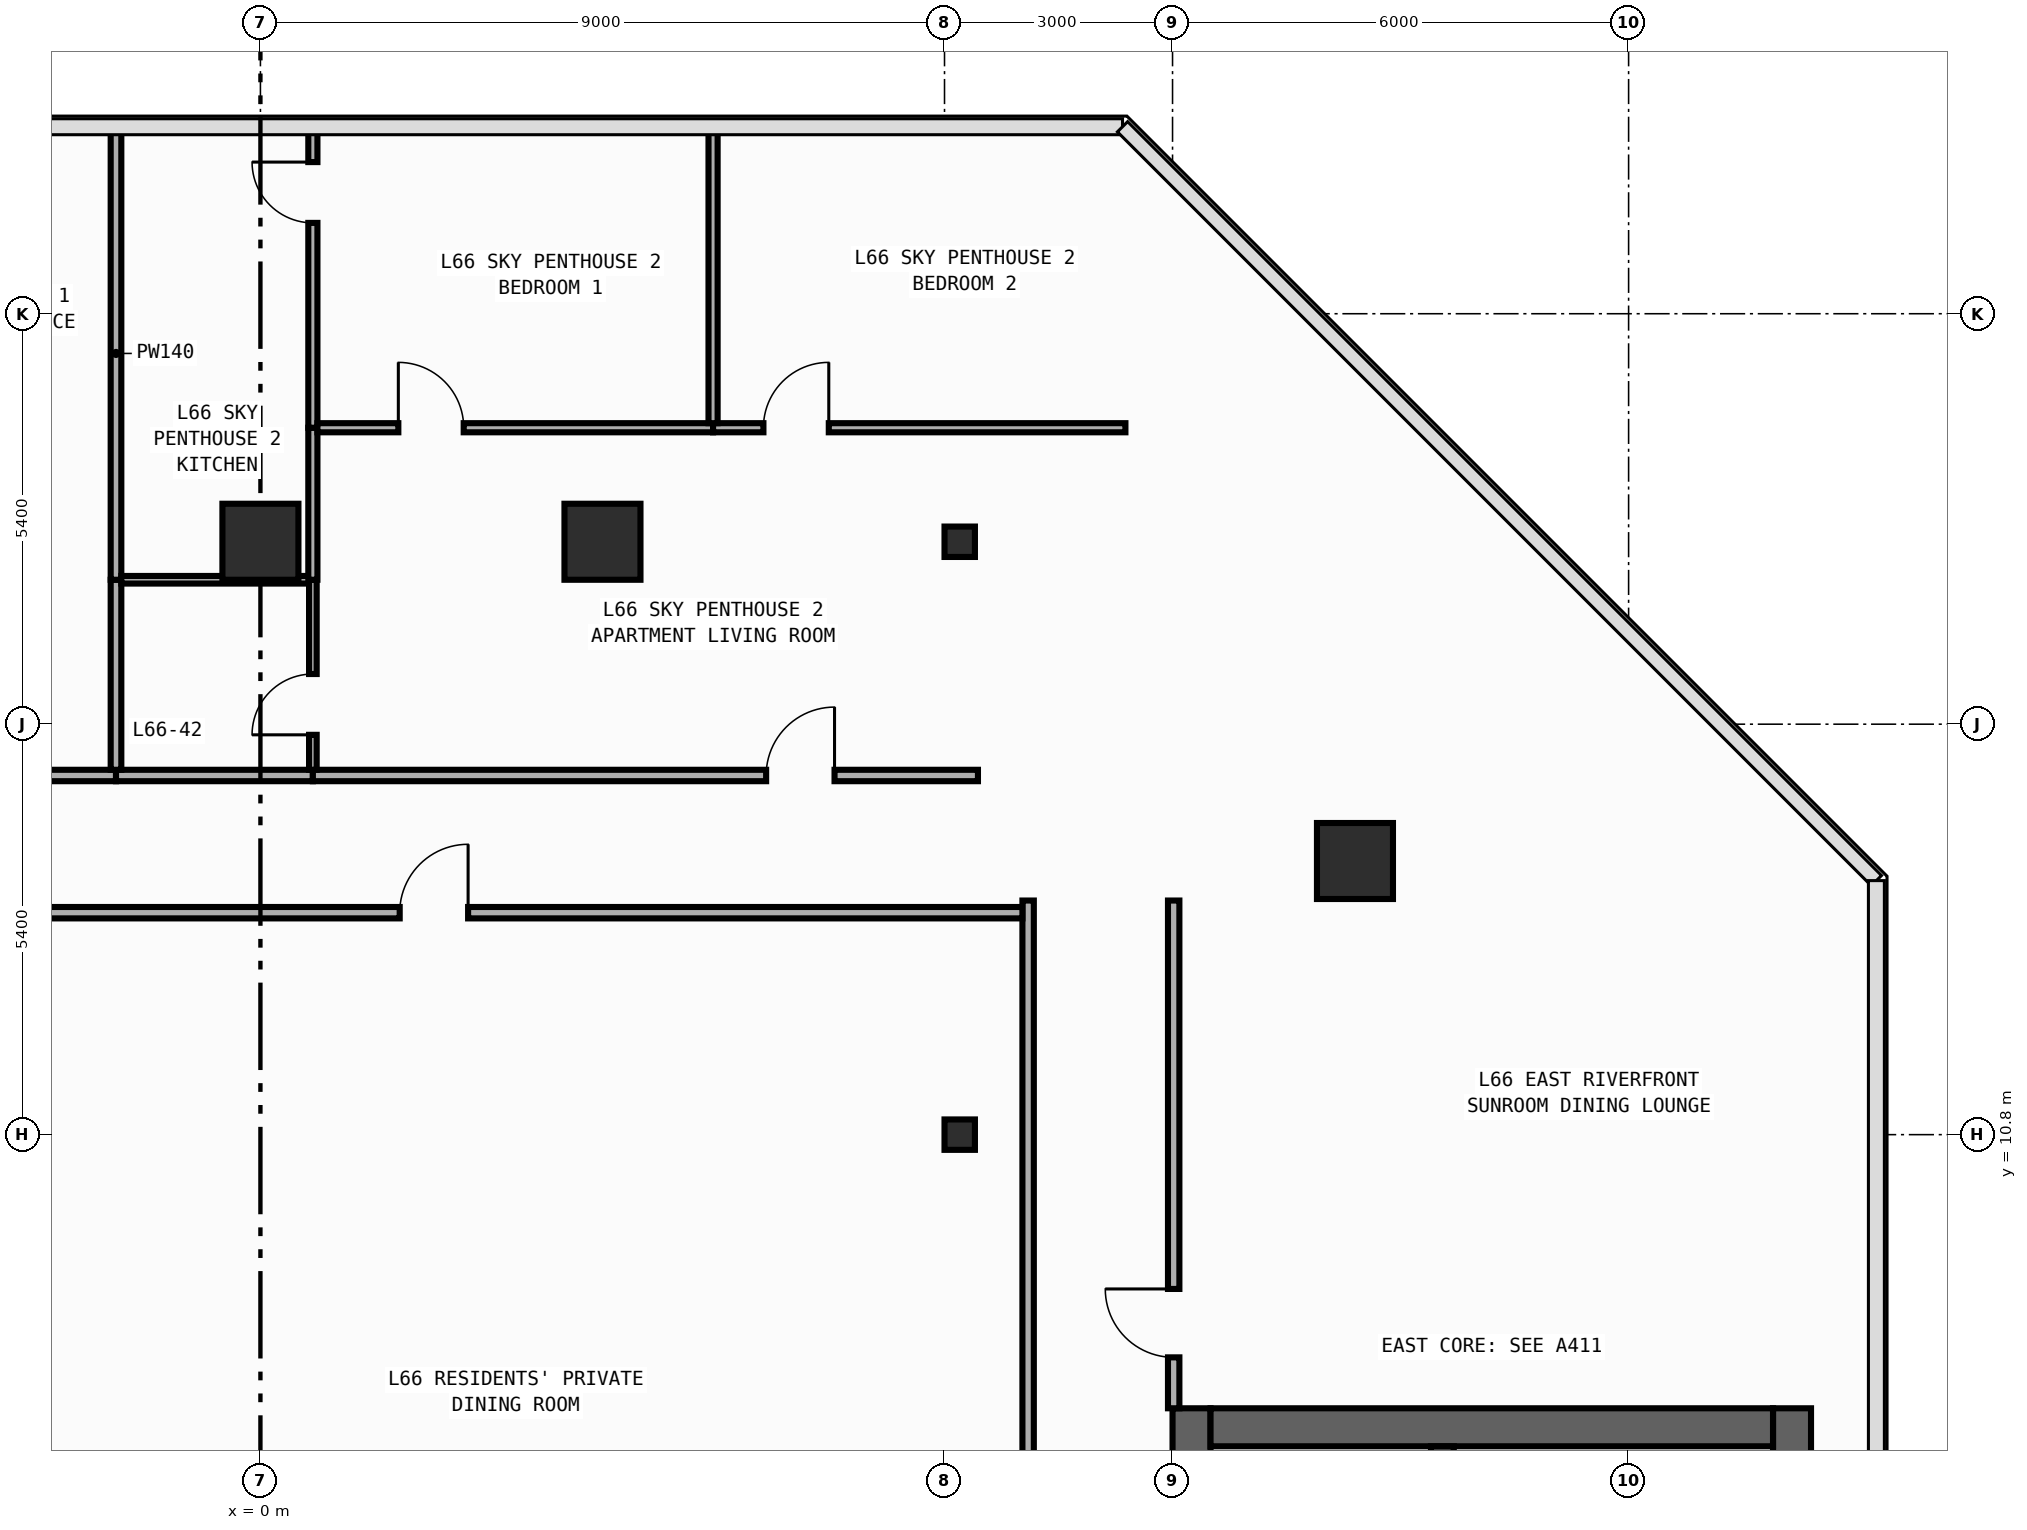
"""IFC4 building model, lengths in metres.
Left out: names, types, materials, properties, quantities, classifications, styles, units other than length and angle.
Written with IfcOpenShell. Run it as: python <this file> out.ifc"""

import sys

from ifc_helpers import new_model, si_unit, direction, frame, frame_2d, origin, origin_2d, place, context, subcontext, project, spatial, rectangle, circle, i_section, extrude, element, fill, save


model = new_model("IFC4")
c1 = context("Model", 3, precision=1e-05, world=origin(), true_north=direction((0.0, 1.0)))
c2 = subcontext(c1, "Body", "Model", "MODEL_VIEW")
j1 = project(units=[si_unit("LENGTHUNIT", "METRE"), si_unit("PLANEANGLEUNIT", "RADIAN")], contexts=[c1])
p1 = place(None, origin())
s1 = spatial("IfcSite", under=j1, at=p1, CompositionType="ELEMENT")
p2 = place(p1, origin())
s2 = spatial("IfcBuilding", under=s1, at=p2, CompositionType="ELEMENT")
p3 = place(p2, frame((0.0, 0.0, 277.6)))
s3 = spatial("IfcBuildingStorey", under=s2, at=p3, CompositionType="ELEMENT", Elevation=277.6)
p4 = place(p3, frame((12.25, -19.8, 0.0), z_axis=(0.0, 0.0, 1.0), x_axis=(0.0, 1.0, 0.0)))
e1 = element("IfcWall", 1, at=p4, inside=s3, PredefinedType="SHEAR", context=c2, shape_type="SweptSolid", body=[
    extrude(rectangle(XDim=27.0, YDim=0.5, at=frame_2d((13.5, 0.0))), origin(), (0.0, 0.0, 1.0), 3.54),
])
p5 = place(p4, frame((23.05, 0.0, 0.0)))
e2 = element("IfcOpeningElement", 2, at=p5, cuts=e1, PredefinedType="OPENING", context=c2, shape_type="SweptSolid", body=[
    extrude(rectangle(XDim=1.1, YDim=2.2, at=frame_2d((0.55, 1.1))), frame((0.0, 0.26, 0.0), z_axis=(0.0, -1.0, 0.0), x_axis=(1.0, 0.0, 0.0)), (0.0, 0.0, 1.0), 0.52),
])
p6 = place(p4, frame((19.85, 0.0, 0.0)))
e3 = element("IfcOpeningElement", 3, at=p6, cuts=e1, PredefinedType="OPENING", context=c2, shape_type="SweptSolid", body=[
    extrude(rectangle(XDim=1.1, YDim=2.2, at=frame_2d((0.55, 1.1))), frame((0.0, 0.26, 0.0), z_axis=(0.0, -1.0, 0.0), x_axis=(1.0, 0.0, 0.0)), (0.0, 0.0, 1.0), 0.52),
])
p7 = place(p4, frame((16.65, 0.0, 0.0)))
e4 = element("IfcOpeningElement", 4, at=p7, cuts=e1, PredefinedType="OPENING", context=c2, shape_type="SweptSolid", body=[
    extrude(rectangle(XDim=1.1, YDim=2.2, at=frame_2d((0.55, 1.1))), frame((0.0, 0.26, 0.0), z_axis=(0.0, -1.0, 0.0), x_axis=(1.0, 0.0, 0.0)), (0.0, 0.0, 1.0), 0.52),
])
p8 = place(p4, frame((6.275, 0.0, 0.0)))
e5 = element("IfcOpeningElement", 5, at=p8, cuts=e1, PredefinedType="OPENING", context=c2, shape_type="SweptSolid", body=[
    extrude(rectangle(XDim=0.85, YDim=2.1, at=frame_2d((0.425, 1.05))), frame((0.0, 0.26, 0.0), z_axis=(0.0, -1.0, 0.0), x_axis=(1.0, 0.0, 0.0)), (0.0, 0.0, 1.0), 0.52),
])
p9 = place(p4, frame((8.575, 0.0, 0.0)))
e6 = element("IfcOpeningElement", 6, at=p9, cuts=e1, PredefinedType="OPENING", context=c2, shape_type="SweptSolid", body=[
    extrude(rectangle(XDim=0.85, YDim=2.1, at=frame_2d((0.425, 1.05))), frame((0.0, 0.26, 0.0), z_axis=(0.0, -1.0, 0.0), x_axis=(1.0, 0.0, 0.0)), (0.0, 0.0, 1.0), 0.52),
])
p10 = place(p4, frame((10.675, 0.0, 0.0)))
e7 = element("IfcOpeningElement", 7, at=p10, cuts=e1, PredefinedType="OPENING", context=c2, shape_type="SweptSolid", body=[
    extrude(rectangle(XDim=0.85, YDim=2.1, at=frame_2d((0.425, 1.05))), frame((0.0, 0.26, 0.0), z_axis=(0.0, -1.0, 0.0), x_axis=(1.0, 0.0, 0.0)), (0.0, 0.0, 1.0), 0.52),
])
p11 = place(p4, frame((12.725, 0.0, 0.0)))
e8 = element("IfcOpeningElement", 8, at=p11, cuts=e1, PredefinedType="OPENING", context=c2, shape_type="SweptSolid", body=[
    extrude(rectangle(XDim=1.15, YDim=2.2, at=frame_2d((0.575, 1.1))), frame((0.0, 0.26, 0.0), z_axis=(0.0, -1.0, 0.0), x_axis=(1.0, 0.0, 0.0)), (0.0, 0.0, 1.0), 0.52),
])
p12 = place(p4, frame((25.125, 0.0, 0.0)))
e9 = element("IfcOpeningElement", 9, at=p12, cuts=e1, PredefinedType="OPENING", context=c2, shape_type="SweptSolid", body=[
    extrude(rectangle(XDim=0.85, YDim=2.1, at=frame_2d((0.425, 1.05))), frame((0.0, 0.26, 0.0), z_axis=(0.0, -1.0, 0.0), x_axis=(1.0, 0.0, 0.0)), (0.0, 0.0, 1.0), 0.52),
])
p13 = place(p3, frame((20.15, -19.8, 0.0), z_axis=(0.0, 0.0, 1.0), x_axis=(0.0, 1.0, 0.0)))
e10 = element("IfcWall", 10, at=p13, inside=s3, PredefinedType="SHEAR", context=c2, shape_type="SweptSolid", body=[
    extrude(rectangle(XDim=27.0, YDim=0.5, at=frame_2d((13.5, 0.0))), origin(), (0.0, 0.0, 1.0), 3.54),
])
p14 = place(p3, frame((12.5, 6.95, 0.0), z_axis=(0.0, 0.0, 1.0), x_axis=(1.0, 0.0, 0.0)))
e11 = element("IfcWall", 11, at=p14, inside=s3, PredefinedType="SHEAR", context=c2, shape_type="SweptSolid", body=[
    extrude(rectangle(XDim=7.4, YDim=0.5, at=frame_2d((3.7, 0.0))), origin(), (0.0, 0.0, 1.0), 3.54),
])
p15 = place(p3, frame((15.55, -19.3, 0.0), z_axis=(0.0, 0.0, 1.0), x_axis=(0.0, 1.0, 0.0)))
e12 = element("IfcWall", 12, at=p15, inside=s3, PredefinedType="SHEAR", context=c2, shape_type="SweptSolid", body=[
    extrude(rectangle(XDim=26.0, YDim=0.3, at=frame_2d((13.0, 0.0))), origin(), (0.0, 0.0, 1.0), 3.54),
])
p16 = place(p15, frame((12.225, 0.0, 0.0)))
e13 = element("IfcOpeningElement", 13, at=p16, cuts=e12, PredefinedType="OPENING", context=c2, shape_type="SweptSolid", body=[
    extrude(rectangle(XDim=1.15, YDim=2.2, at=frame_2d((0.575, 1.1))), frame((0.0, 0.16, 0.0), z_axis=(0.0, -1.0, 0.0), x_axis=(1.0, 0.0, 0.0)), (0.0, 0.0, 1.0), 0.32),
])
p17 = place(p15, frame((24.625, 0.0, 0.0)))
e14 = element("IfcOpeningElement", 14, at=p17, cuts=e12, PredefinedType="OPENING", context=c2, shape_type="SweptSolid", body=[
    extrude(rectangle(XDim=0.85, YDim=2.1, at=frame_2d((0.425, 1.05))), frame((0.0, 0.16, 0.0), z_axis=(0.0, -1.0, 0.0), x_axis=(1.0, 0.0, 0.0)), (0.0, 0.0, 1.0), 0.32),
])
for number, where, z_axis, x_axis in (
    (15, (9.2, 10.8, 0.0), (0.0, 0.0, 1.0), (1.0, 0.0, 0.0)),
    (16, (9.2, 18.6, 0.0), (0.0, 0.0, 1.0), (1.0, 0.0, 0.0)),
):
    element("IfcColumn", number, at=place(p3, frame(where, z_axis=z_axis, x_axis=x_axis)), inside=s3, PredefinedType="COLUMN", context=c2, shape_type="SweptSolid", body=[
        extrude(i_section(OverallWidth=0.4, OverallDepth=0.4, WebThickness=0.013, FlangeThickness=0.021, FilletRadius=0.022, at=origin_2d()), origin(), (0.0, 0.0, 1.0), 3.8),
    ])
for number, where, z_axis, x_axis in (
    (17, (14.4, 14.4, 0.0), (0.0, 0.0, 1.0), (1.0, 0.0, 0.0)),
    (18, (0.0, 18.6, 0.0), (0.0, 0.0, 1.0), (1.0, 0.0, 0.0)),
    (19, (4.5, 18.6, 0.0), (0.0, 0.0, 1.0), (1.0, 0.0, 0.0)),
):
    element("IfcColumn", number, at=place(p3, frame(where, z_axis=z_axis, x_axis=x_axis)), inside=s3, PredefinedType="COLUMN", context=c2, shape_type="SweptSolid", body=[
        extrude(circle(Radius=0.5, at=origin_2d()), origin(), (0.0, 0.0, 1.0), 3.8),
    ])
p18 = place(p3, frame((12.015, 7.2, 0.0), z_axis=(0.0, 0.0, 1.0), x_axis=(0.0, 1.0, 0.0)))
e20 = element("IfcWall", 20, at=p18, inside=s3, PredefinedType="PARTITIONING", context=c2, shape_type="SweptSolid", body=[
    extrude(rectangle(XDim=6.68, YDim=0.15, at=frame_2d((3.34, 0.0))), origin(), (0.0, 0.0, 1.0), 3.54),
])
p19 = place(p18, frame((0.67, 0.0, 0.0)))
e21 = element("IfcOpeningElement", 21, at=p19, cuts=e20, PredefinedType="OPENING", context=c2, shape_type="SweptSolid", body=[
    extrude(rectangle(XDim=0.9, YDim=2.15, at=frame_2d((0.45, 1.075))), frame((0.0, 0.085, 0.0), z_axis=(0.0, -1.0, 0.0), x_axis=(1.0, 0.0, 0.0)), (0.0, 0.0, 1.0), 0.17),
])
p20 = place(p3, frame((10.1, -2.81, 0.0), z_axis=(0.0, 0.0, 1.0), x_axis=(0.0, 1.0, 0.0)))
e22 = element("IfcWall", 22, at=p20, inside=s3, PredefinedType="PARTITIONING", context=c2, shape_type="SweptSolid", body=[
    extrude(rectangle(XDim=16.69, YDim=0.15, at=frame_2d((8.345, 0.0))), origin(), (0.0, 0.0, 1.0), 3.54),
])
p21 = place(p20, frame((7.694, 0.0, 0.0)))
e23 = element("IfcOpeningElement", 23, at=p21, cuts=e22, PredefinedType="OPENING", context=c2, shape_type="SweptSolid", body=[
    extrude(rectangle(XDim=0.9, YDim=2.15, at=frame_2d((0.45, 1.075))), frame((0.0, 0.085, 0.0), z_axis=(0.0, -1.0, 0.0), x_axis=(1.0, 0.0, 0.0)), (0.0, 0.0, 1.0), 0.17),
])
p22 = place(p3, frame((-5.94, 15.525, 0.0), z_axis=(0.0, 0.0, 1.0), x_axis=(1.0, 0.0, 0.0)))
e24 = element("IfcWall", 24, at=p22, inside=s3, PredefinedType="PARTITIONING", context=c2, shape_type="SweptSolid", body=[
    extrude(rectangle(XDim=4.04, YDim=0.15, at=frame_2d((2.02, 0.0))), origin(), (0.0, 0.0, 1.0), 3.54),
])
p23 = place(p3, frame((-1.9, 15.525, 0.0), z_axis=(0.0, 0.0, 1.0), x_axis=(1.0, 0.0, 0.0)))
e25 = element("IfcWall", 25, at=p23, inside=s3, PredefinedType="PARTITIONING", context=c2, shape_type="SweptSolid", body=[
    extrude(rectangle(XDim=2.59, YDim=0.15, at=frame_2d((1.295, 0.0))), origin(), (0.0, 0.0, 1.0), 3.54),
])
p24 = place(p3, frame((0.69, 15.525, 0.0), z_axis=(0.0, 0.0, 1.0), x_axis=(1.0, 0.0, 0.0)))
e26 = element("IfcWall", 26, at=p24, inside=s3, PredefinedType="PARTITIONING", context=c2, shape_type="SweptSolid", body=[
    extrude(rectangle(XDim=8.75, YDim=0.15, at=frame_2d((4.375, 0.0))), origin(), (0.0, 0.0, 1.0), 3.54),
])
p25 = place(p24, frame((5.963, 0.0, 0.0)))
e27 = element("IfcOpeningElement", 27, at=p25, cuts=e26, PredefinedType="OPENING", context=c2, shape_type="SweptSolid", body=[
    extrude(rectangle(XDim=0.9, YDim=2.15, at=frame_2d((0.45, 1.075))), frame((0.0, 0.085, 0.0), z_axis=(0.0, -1.0, 0.0), x_axis=(1.0, 0.0, 0.0)), (0.0, 0.0, 1.0), 0.17),
])
p26 = place(p3, frame((-2.86, 13.72, 0.0), z_axis=(0.0, 0.0, 1.0), x_axis=(1.0, 0.0, 0.0)))
e28 = element("IfcWall", 28, at=p26, inside=s3, PredefinedType="PARTITIONING", context=c2, shape_type="SweptSolid", body=[
    extrude(rectangle(XDim=12.885, YDim=0.15, at=frame_2d((6.442, 0.0))), origin(), (0.0, 0.0, 1.0), 3.54),
])
p27 = place(p26, frame((4.692, 0.0, 0.0)))
e29 = element("IfcOpeningElement", 29, at=p27, cuts=e28, PredefinedType="OPENING", context=c2, shape_type="SweptSolid", body=[
    extrude(rectangle(XDim=0.9, YDim=2.15, at=frame_2d((0.45, 1.075))), frame((0.0, 0.085, 0.0), z_axis=(0.0, -1.0, 0.0), x_axis=(1.0, 0.0, 0.0)), (0.0, 0.0, 1.0), 0.17),
])
p28 = place(p3, frame((-1.9, 15.6, 0.0), z_axis=(0.0, 0.0, 1.0), x_axis=(0.0, 1.0, 0.0)))
e30 = element("IfcWall", 30, at=p28, inside=s3, PredefinedType="PARTITIONING", context=c2, shape_type="SweptSolid", body=[
    extrude(rectangle(XDim=2.5, YDim=0.14, at=frame_2d((1.25, 0.0))), origin(), (0.0, 0.0, 1.0), 3.54),
])
p29 = place(p3, frame((-1.9, 18.1, 0.0), z_axis=(0.0, 0.0, 1.0), x_axis=(0.0, 1.0, 0.0)))
e31 = element("IfcWall", 31, at=p29, inside=s3, PredefinedType="PARTITIONING", context=c2, shape_type="SweptSolid", body=[
    extrude(rectangle(XDim=5.955, YDim=0.14, at=frame_2d((2.978, 0.0))), origin(), (0.0, 0.0, 1.0), 3.54),
])
p30 = place(p3, frame((-1.83, 18.1, 0.0), z_axis=(0.0, 0.0, 1.0), x_axis=(1.0, 0.0, 0.0)))
e32 = element("IfcWall", 32, at=p30, inside=s3, PredefinedType="PARTITIONING", context=c2, shape_type="SweptSolid", body=[
    extrude(rectangle(XDim=2.47, YDim=0.1, at=frame_2d((1.235, 0.0))), origin(), (0.0, 0.0, 1.0), 3.54),
])
p31 = place(p3, frame((0.69, 15.6, 0.0), z_axis=(0.0, 0.0, 1.0), x_axis=(0.0, 1.0, 0.0)))
e33 = element("IfcWall", 33, at=p31, inside=s3, PredefinedType="PARTITIONING", context=c2, shape_type="SweptSolid", body=[
    extrude(rectangle(XDim=2.5, YDim=0.1, at=frame_2d((1.25, 0.0))), origin(), (0.0, 0.0, 1.0), 3.54),
])
p32 = place(p31, frame((0.46, 0.0, 0.0)))
e34 = element("IfcOpeningElement", 34, at=p32, cuts=e33, PredefinedType="OPENING", context=c2, shape_type="SweptSolid", body=[
    extrude(rectangle(XDim=0.8, YDim=2.1, at=frame_2d((0.4, 1.05))), frame((0.0, 0.06, 0.0), z_axis=(0.0, -1.0, 0.0), x_axis=(1.0, 0.0, 0.0)), (0.0, 0.0, 1.0), 0.12),
])
p33 = place(p3, frame((0.69, 18.1, 0.0), z_axis=(0.0, 0.0, 1.0), x_axis=(0.0, 1.0, 0.0)))
e35 = element("IfcWall", 35, at=p33, inside=s3, PredefinedType="PARTITIONING", context=c2, shape_type="SweptSolid", body=[
    extrude(rectangle(XDim=2.0, YDim=0.12, at=frame_2d((1.0, 0.0))), origin(), (0.0, 0.0, 1.0), 3.54),
])
p34 = place(p3, frame((0.69, 20.1, 0.0), z_axis=(0.0, 0.0, 1.0), x_axis=(0.0, 1.0, 0.0)))
e36 = element("IfcWall", 36, at=p34, inside=s3, PredefinedType="PARTITIONING", context=c2, shape_type="SweptSolid", body=[
    extrude(rectangle(XDim=3.955, YDim=0.12, at=frame_2d((1.978, 0.0))), origin(), (0.0, 0.0, 1.0), 3.54),
])
p35 = place(p34, frame((2.695, 0.0, 0.0)))
e37 = element("IfcOpeningElement", 37, at=p35, cuts=e36, PredefinedType="OPENING", context=c2, shape_type="SweptSolid", body=[
    extrude(rectangle(XDim=0.8, YDim=2.1, at=frame_2d((0.4, 1.05))), frame((0.0, 0.07, 0.0), z_axis=(0.0, -1.0, 0.0), x_axis=(1.0, 0.0, 0.0)), (0.0, 0.0, 1.0), 0.14),
])
p36 = place(p3, frame((0.75, 20.1, 0.0), z_axis=(0.0, 0.0, 1.0), x_axis=(1.0, 0.0, 0.0)))
e38 = element("IfcWall", 38, at=p36, inside=s3, PredefinedType="PARTITIONING", context=c2, shape_type="SweptSolid", body=[
    extrude(rectangle(XDim=5.205, YDim=0.12, at=frame_2d((2.603, 0.0))), origin(), (0.0, 0.0, 1.0), 3.54),
])
p37 = place(p36, frame((1.064, 0.0, 0.0)))
e39 = element("IfcOpeningElement", 39, at=p37, cuts=e38, PredefinedType="OPENING", context=c2, shape_type="SweptSolid", body=[
    extrude(rectangle(XDim=0.86, YDim=2.15, at=frame_2d((0.43, 1.075))), frame((0.0, 0.07, 0.0), z_axis=(0.0, -1.0, 0.0), x_axis=(1.0, 0.0, 0.0)), (0.0, 0.0, 1.0), 0.14),
])
p38 = place(p3, frame((5.955, 20.1, 0.0), z_axis=(0.0, 0.0, 1.0), x_axis=(1.0, 0.0, 0.0)))
e40 = element("IfcWall", 40, at=p38, inside=s3, PredefinedType="PARTITIONING", context=c2, shape_type="SweptSolid", body=[
    extrude(rectangle(XDim=5.425, YDim=0.12, at=frame_2d((2.712, 0.0))), origin(), (0.0, 0.0, 1.0), 3.54),
])
p39 = place(p38, frame((0.663, 0.0, 0.0)))
e41 = element("IfcOpeningElement", 41, at=p39, cuts=e40, PredefinedType="OPENING", context=c2, shape_type="SweptSolid", body=[
    extrude(rectangle(XDim=0.86, YDim=2.15, at=frame_2d((0.43, 1.075))), frame((0.0, 0.07, 0.0), z_axis=(0.0, -1.0, 0.0), x_axis=(1.0, 0.0, 0.0)), (0.0, 0.0, 1.0), 0.14),
])
p40 = place(p3, frame((5.955, 20.16, 0.0), z_axis=(0.0, 0.0, 1.0), x_axis=(0.0, 1.0, 0.0)))
e42 = element("IfcWall", 42, at=p40, inside=s3, PredefinedType="PARTITIONING", context=c2, shape_type="SweptSolid", body=[
    extrude(rectangle(XDim=3.895, YDim=0.12, at=frame_2d((1.948, 0.0))), origin(), (0.0, 0.0, 1.0), 3.54),
])
p41 = place(p19, origin())
e43 = element("IfcDoor", 43, at=p41, inside=s3, OperationType="SINGLE_SWING_RIGHT", PredefinedType="DOOR", context=c2, shape_type="SweptSolid", body=[
    extrude(rectangle(XDim=0.9, YDim=2.15, at=frame_2d((0.45, 1.075))), frame((0.0, 0.025, 0.0), z_axis=(0.0, -1.0, 0.0), x_axis=(1.0, 0.0, 0.0)), (0.0, 0.0, 1.0), 0.05),
])
fill(e21, e43)
p42 = place(p25, origin())
e44 = element("IfcDoor", 44, at=p42, inside=s3, OperationType="SINGLE_SWING_RIGHT", PredefinedType="DOOR", context=c2, shape_type="SweptSolid", body=[
    extrude(rectangle(XDim=0.9, YDim=2.15, at=frame_2d((0.45, 1.075))), frame((0.0, 0.025, 0.0), z_axis=(0.0, -1.0, 0.0), x_axis=(1.0, 0.0, 0.0)), (0.0, 0.0, 1.0), 0.05),
])
fill(e27, e44)
p43 = place(p27, origin())
e45 = element("IfcDoor", 45, at=p43, inside=s3, OperationType="SINGLE_SWING_RIGHT", PredefinedType="DOOR", context=c2, shape_type="SweptSolid", body=[
    extrude(rectangle(XDim=0.9, YDim=2.15, at=frame_2d((0.45, 1.075))), frame((0.0, 0.025, 0.0), z_axis=(0.0, -1.0, 0.0), x_axis=(1.0, 0.0, 0.0)), (0.0, 0.0, 1.0), 0.05),
])
fill(e29, e45)
p44 = place(p32, origin())
e46 = element("IfcDoor", 46, at=p44, inside=s3, OperationType="SINGLE_SWING_LEFT", PredefinedType="DOOR", context=c2, shape_type="SweptSolid", body=[
    extrude(rectangle(XDim=0.8, YDim=2.1, at=frame_2d((0.4, 1.05))), frame((0.0, 0.025, 0.0), z_axis=(0.0, -1.0, 0.0), x_axis=(1.0, 0.0, 0.0)), (0.0, 0.0, 1.0), 0.05),
])
fill(e34, e46)
p45 = place(p37, origin())
e47 = element("IfcDoor", 47, at=p45, inside=s3, OperationType="SINGLE_SWING_LEFT", PredefinedType="DOOR", context=c2, shape_type="SweptSolid", body=[
    extrude(rectangle(XDim=0.86, YDim=2.15, at=frame_2d((0.43, 1.075))), frame((0.0, 0.025, 0.0), z_axis=(0.0, -1.0, 0.0), x_axis=(1.0, 0.0, 0.0)), (0.0, 0.0, 1.0), 0.05),
])
fill(e39, e47)
p46 = place(p39, origin())
e48 = element("IfcDoor", 48, at=p46, inside=s3, OperationType="SINGLE_SWING_RIGHT", PredefinedType="DOOR", context=c2, shape_type="SweptSolid", body=[
    extrude(rectangle(XDim=0.86, YDim=2.15, at=frame_2d((0.43, 1.075))), frame((0.0, 0.025, 0.0), z_axis=(0.0, -1.0, 0.0), x_axis=(1.0, 0.0, 0.0)), (0.0, 0.0, 1.0), 0.05),
])
fill(e41, e48)
p47 = place(p35, origin())
e49 = element("IfcDoor", 49, at=p47, inside=s3, OperationType="SINGLE_SWING_RIGHT", PredefinedType="DOOR", context=c2, shape_type="SweptSolid", body=[
    extrude(rectangle(XDim=0.8, YDim=2.1, at=frame_2d((0.4, 1.05))), frame((0.0, 0.025, 0.0), z_axis=(0.0, -1.0, 0.0), x_axis=(1.0, 0.0, 0.0)), (0.0, 0.0, 1.0), 0.05),
])
fill(e37, e49)
save(model, sys.argv[1])
